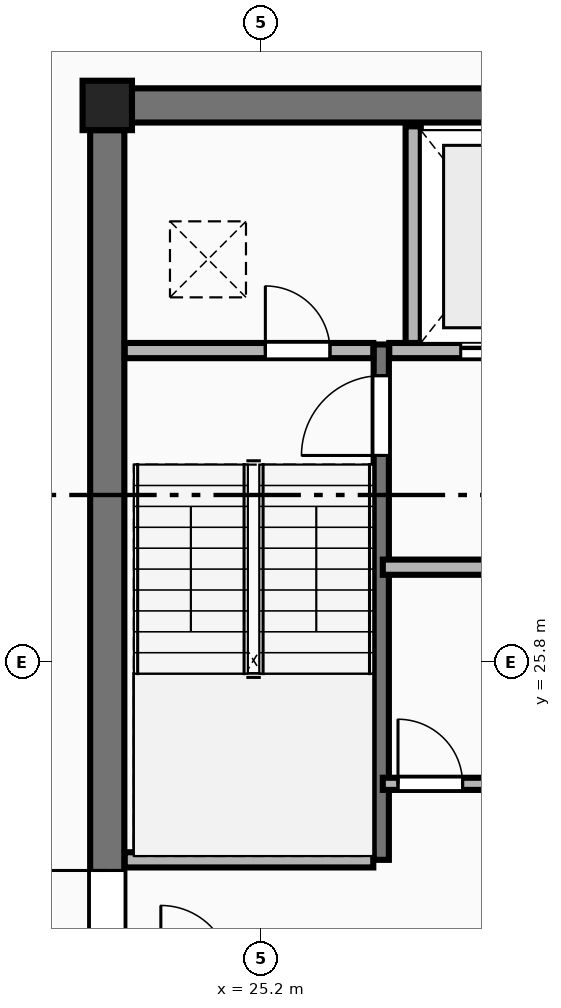
"""IFC4 building model, lengths in metres.
Left out: names, types, materials, properties, quantities, classifications, styles, units other than length and angle.
Written with IfcOpenShell. Run it as: python <this file> out.ifc"""

import sys

from ifc_helpers import new_model, si_unit, direction, frame, frame_2d, origin, origin_2d, place, context, subcontext, project, spatial, rectangle, extrude, element, fill, save


model = new_model("IFC4")
c1 = context("Model", 3, precision=1e-05, world=origin(), true_north=direction((0.0, 1.0)))
c2 = subcontext(c1, "Body", "Model", "MODEL_VIEW")
j1 = project(units=[si_unit("LENGTHUNIT", "METRE"), si_unit("PLANEANGLEUNIT", "RADIAN")], contexts=[c1])
p1 = place(None, origin())
s1 = spatial("IfcSite", under=j1, at=p1, CompositionType="ELEMENT")
p2 = place(p1, origin())
s2 = spatial("IfcBuilding", under=s1, at=p2, CompositionType="ELEMENT")
p3 = place(p2, frame((0.0, 0.0, 234.3)))
s3 = spatial("IfcBuildingStorey", under=s2, at=p3, CompositionType="ELEMENT", Elevation=234.3)
p4 = place(p3, frame((23.175, 33.125, 0.0), z_axis=(0.0, 0.0, 1.0), x_axis=(1.0, 0.0, 0.0)))
e1 = element("IfcColumn", 1, at=p4, inside=s3, PredefinedType="COLUMN", context=c2, shape_type="SweptSolid", body=[
    extrude(rectangle(XDim=0.65, YDim=0.65, at=origin_2d()), origin(), (0.0, 0.0, 1.0), 3.65),
])
p5 = place(p3, frame((23.5, 33.125, 0.0), z_axis=(0.0, 0.0, 1.0), x_axis=(1.0, 0.0, 0.0)))
e2 = element("IfcWall", 2, at=p5, inside=s3, PredefinedType="SHEAR", context=c2, shape_type="SweptSolid", body=[
    extrude(rectangle(XDim=17.8, YDim=0.45, at=frame_2d((8.9, 0.0))), origin(), (0.0, 0.0, 1.0), 3.45),
])
p6 = place(p3, frame((23.175, 19.0, 0.0), z_axis=(0.0, 0.0, 1.0), x_axis=(0.0, 1.0, 0.0)))
e3 = element("IfcWall", 3, at=p6, inside=s3, PredefinedType="SHEAR", context=c2, shape_type="SweptSolid", body=[
    extrude(rectangle(XDim=13.8, YDim=0.45, at=frame_2d((6.9, 0.0))), origin(), (0.0, 0.0, 1.0), 3.45),
])
p7 = place(p6, frame((2.84, 0.0, 0.0)))
e4 = element("IfcOpeningElement", 4, at=p7, cuts=e3, PredefinedType="OPENING", context=c2, shape_type="SweptSolid", body=[
    extrude(rectangle(XDim=1.22, YDim=2.25, at=frame_2d((0.61, 1.125))), frame((0.0, 0.235, 0.0), z_axis=(0.0, -1.0, 0.0), x_axis=(1.0, 0.0, 0.0)), (0.0, 0.0, 1.0), 0.47),
])
p8 = place(p3, frame((26.78, 23.2, 0.0), z_axis=(0.0, 0.0, 1.0), x_axis=(0.0, 1.0, 0.0)))
e5 = element("IfcWall", 5, at=p8, inside=s3, PredefinedType="SHEAR", context=c2, shape_type="SweptSolid", body=[
    extrude(rectangle(XDim=6.78, YDim=0.2, at=frame_2d((3.39, 0.0))), origin(), (0.0, 0.0, 1.0), 3.65),
])
p9 = place(p8, frame((5.32, 0.0, 0.0)))
e6 = element("IfcOpeningElement", 6, at=p9, cuts=e5, PredefinedType="OPENING", context=c2, shape_type="SweptSolid", body=[
    extrude(rectangle(XDim=1.05, YDim=2.15, at=frame_2d((0.525, 1.075))), frame((0.0, 0.11, 0.0), z_axis=(0.0, -1.0, 0.0), x_axis=(1.0, 0.0, 0.0)), (0.0, 0.0, 1.0), 0.22),
])
p10 = place(p3, frame((23.405, 23.2, 0.0), z_axis=(0.0, 0.0, 1.0), x_axis=(1.0, 0.0, 0.0)))
e7 = element("IfcWall", 7, at=p10, inside=s3, PredefinedType="PLUMBINGWALL", context=c2, shape_type="SweptSolid", body=[
    extrude(rectangle(XDim=3.27, YDim=0.2, at=frame_2d((1.635, 0.0))), origin(), (0.0, 0.0, 1.0), 3.45),
])
p11 = place(p3, frame((23.405, 29.9, 0.0), z_axis=(0.0, 0.0, 1.0), x_axis=(1.0, 0.0, 0.0)))
e8 = element("IfcWall", 8, at=p11, inside=s3, PredefinedType="PLUMBINGWALL", context=c2, shape_type="SweptSolid", body=[
    extrude(rectangle(XDim=3.27, YDim=0.2, at=frame_2d((1.635, 0.0))), origin(), (0.0, 0.0, 1.0), 3.45),
])
p12 = place(p11, frame((1.85, 0.0, 0.0)))
e9 = element("IfcOpeningElement", 9, at=p12, cuts=e8, PredefinedType="OPENING", context=c2, shape_type="SweptSolid", body=[
    extrude(rectangle(XDim=0.85, YDim=2.05, at=frame_2d((0.425, 1.025))), frame((0.0, 0.11, 0.0), z_axis=(0.0, -1.0, 0.0), x_axis=(1.0, 0.0, 0.0)), (0.0, 0.0, 1.0), 0.22),
])
p13 = place(p3, frame((26.885, 29.9, 0.0), z_axis=(0.0, 0.0, 1.0), x_axis=(1.0, 0.0, 0.0)))
e10 = element("IfcWall", 10, at=p13, inside=s3, PredefinedType="PLUMBINGWALL", context=c2, shape_type="SweptSolid", body=[
    extrude(rectangle(XDim=3.015, YDim=0.2, at=frame_2d((1.507, 0.0))), origin(), (0.0, 0.0, 1.0), 3.45),
])
p14 = place(p13, frame((0.94, 0.0, 0.0)))
e11 = element("IfcOpeningElement", 11, at=p14, cuts=e10, PredefinedType="OPENING", context=c2, shape_type="SweptSolid", body=[
    extrude(rectangle(XDim=1.15, YDim=2.2, at=frame_2d((0.575, 1.1))), frame((0.0, 0.11, 0.0), z_axis=(0.0, -1.0, 0.0), x_axis=(1.0, 0.0, 0.0)), (0.0, 0.0, 1.0), 0.22),
])
p15 = place(p3, frame((27.2, 30.0, 0.0), z_axis=(0.0, 0.0, 1.0), x_axis=(0.0, 1.0, 0.0)))
e12 = element("IfcWall", 12, at=p15, inside=s3, PredefinedType="PLUMBINGWALL", context=c2, shape_type="SweptSolid", body=[
    extrude(rectangle(XDim=2.85, YDim=0.2, at=frame_2d((1.425, 0.0))), origin(), (0.0, 0.0, 1.0), 3.45),
])
p16 = place(p3, frame((26.8, 27.05, 0.0), z_axis=(0.0, 0.0, 1.0), x_axis=(1.0, 0.0, 0.0)))
e13 = element("IfcWall", 13, at=p16, inside=s3, PredefinedType="PLUMBINGWALL", context=c2, shape_type="SweptSolid", body=[
    extrude(rectangle(XDim=3.2, YDim=0.2, at=frame_2d((1.6, 0.0))), origin(), (0.0, 0.0, 1.0), 3.45),
])
p17 = place(p3, frame((26.8, 24.2, 0.0), z_axis=(0.0, 0.0, 1.0), x_axis=(1.0, 0.0, 0.0)))
e14 = element("IfcWall", 14, at=p17, inside=s3, PredefinedType="PARTITIONING", context=c2, shape_type="SweptSolid", body=[
    extrude(rectangle(XDim=3.2, YDim=0.16, at=frame_2d((1.6, 0.0))), origin(), (0.0, 0.0, 1.0), 3.45),
])
p18 = place(p17, frame((0.2, 0.0, 0.0)))
e15 = element("IfcOpeningElement", 15, at=p18, cuts=e14, PredefinedType="OPENING", context=c2, shape_type="SweptSolid", body=[
    extrude(rectangle(XDim=0.85, YDim=2.05, at=frame_2d((0.425, 1.025))), frame((0.0, 0.09, 0.0), z_axis=(0.0, -1.0, 0.0), x_axis=(1.0, 0.0, 0.0)), (0.0, 0.0, 1.0), 0.18),
])
p19 = place(p17, frame((1.8, 0.0, 0.0)))
e16 = element("IfcOpeningElement", 16, at=p19, cuts=e14, PredefinedType="OPENING", context=c2, shape_type="SweptSolid", body=[
    extrude(rectangle(XDim=0.85, YDim=2.05, at=frame_2d((0.425, 1.025))), frame((0.0, 0.09, 0.0), z_axis=(0.0, -1.0, 0.0), x_axis=(1.0, 0.0, 0.0)), (0.0, 0.0, 1.0), 0.18),
])
p20 = place(p7, origin())
e17 = element("IfcDoor", 17, at=p20, inside=s3, OperationType="SINGLE_SWING_RIGHT", PredefinedType="DOOR", context=c2, shape_type="SweptSolid", body=[
    extrude(rectangle(XDim=1.22, YDim=2.25, at=frame_2d((0.61, 1.125))), frame((0.0, 0.025, 0.0), z_axis=(0.0, -1.0, 0.0), x_axis=(1.0, 0.0, 0.0)), (0.0, 0.0, 1.0), 0.05),
])
fill(e4, e17)
p21 = place(p9, origin())
e18 = element("IfcDoor", 18, at=p21, inside=s3, OperationType="SINGLE_SWING_LEFT", PredefinedType="DOOR", context=c2, shape_type="SweptSolid", body=[
    extrude(rectangle(XDim=1.05, YDim=2.15, at=frame_2d((0.525, 1.075))), frame((0.0, 0.025, 0.0), z_axis=(0.0, -1.0, 0.0), x_axis=(1.0, 0.0, 0.0)), (0.0, 0.0, 1.0), 0.05),
])
fill(e6, e18)
p22 = place(p12, origin())
e19 = element("IfcDoor", 19, at=p22, inside=s3, OperationType="SINGLE_SWING_LEFT", PredefinedType="DOOR", context=c2, shape_type="SweptSolid", body=[
    extrude(rectangle(XDim=0.85, YDim=2.05, at=frame_2d((0.425, 1.025))), frame((0.0, 0.025, 0.0), z_axis=(0.0, -1.0, 0.0), x_axis=(1.0, 0.0, 0.0)), (0.0, 0.0, 1.0), 0.05),
])
fill(e9, e19)
p23 = place(p14, origin())
e20 = element("IfcDoor", 20, at=p23, inside=s3, OperationType="DOUBLE_DOOR_SLIDING", PredefinedType="DOOR", context=c2, shape_type="SweptSolid", body=[
    extrude(rectangle(XDim=1.15, YDim=2.2, at=frame_2d((0.575, 1.1))), frame((0.0, 0.025, 0.0), z_axis=(0.0, -1.0, 0.0), x_axis=(1.0, 0.0, 0.0)), (0.0, 0.0, 1.0), 0.05),
])
fill(e11, e20)
p24 = place(p18, origin())
e21 = element("IfcDoor", 21, at=p24, inside=s3, OperationType="SINGLE_SWING_LEFT", PredefinedType="DOOR", context=c2, shape_type="SweptSolid", body=[
    extrude(rectangle(XDim=0.85, YDim=2.05, at=frame_2d((0.425, 1.025))), frame((0.0, 0.025, 0.0), z_axis=(0.0, -1.0, 0.0), x_axis=(1.0, 0.0, 0.0)), (0.0, 0.0, 1.0), 0.05),
])
fill(e15, e21)
save(model, sys.argv[1])
